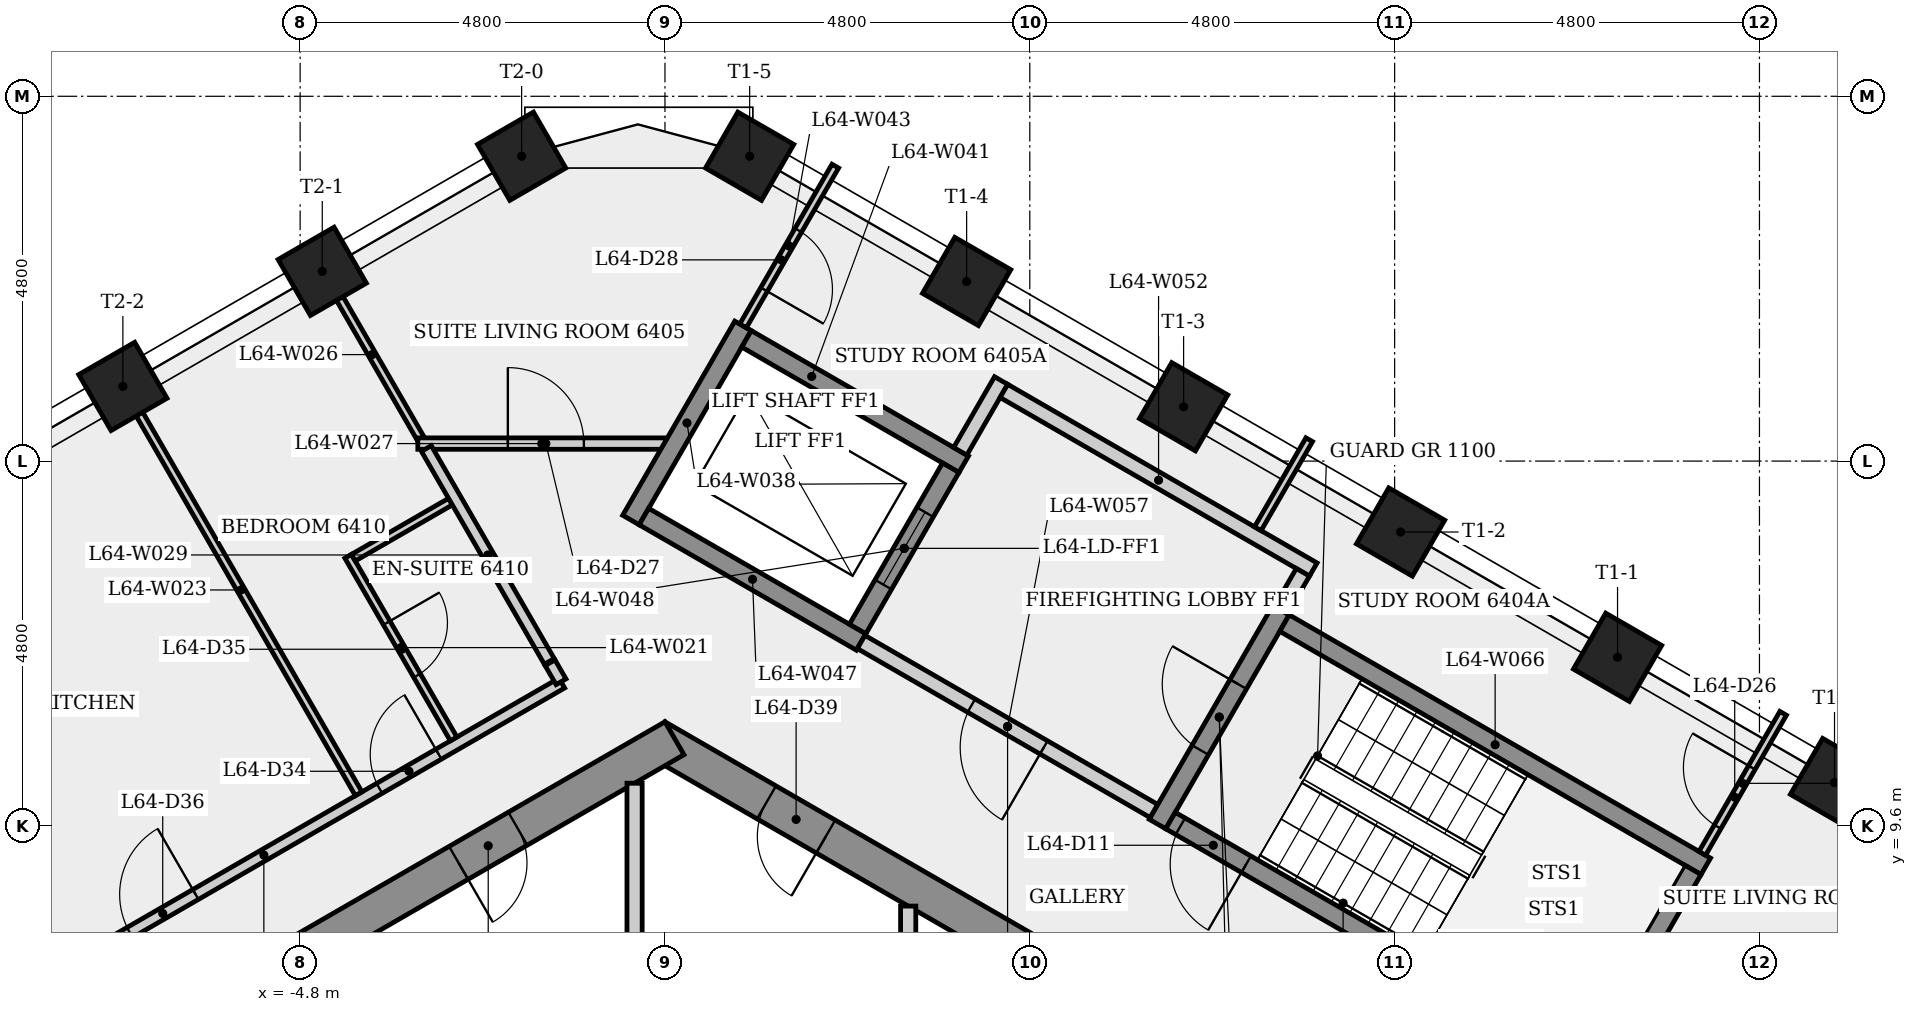
"""IFC4 building model, lengths in metres.
Left out: names, types, materials, properties, quantities, classifications, styles, units other than length and angle.
Written with IfcOpenShell. Run it as: python <this file> out.ifc"""

import sys

from ifc_helpers import new_model, si_unit, direction, frame, frame_2d, origin, origin_2d, place, context, subcontext, project, spatial, rectangle, extrude, element, fill, save


model = new_model("IFC4")
c1 = context("Model", 3, precision=1e-05, world=origin(), true_north=direction((0.0, 1.0)))
c2 = subcontext(c1, "Body", "Model", "MODEL_VIEW")
j1 = project(units=[si_unit("LENGTHUNIT", "METRE"), si_unit("PLANEANGLEUNIT", "RADIAN")], contexts=[c1])
p1 = place(None, origin())
s1 = spatial("IfcSite", under=j1, at=p1, CompositionType="ELEMENT")
p2 = place(p1, origin())
s2 = spatial("IfcBuilding", under=s1, at=p2, CompositionType="ELEMENT")
p3 = place(p2, frame((0.0, 0.0, 239.3)))
s3 = spatial("IfcBuildingStorey", under=s2, at=p3, CompositionType="ELEMENT", Elevation=239.3)
p4 = place(p3, frame((9.375, 5.268, 0.0), z_axis=(0.0, 0.0, 1.0), x_axis=(-0.866023993627, 0.500002442456, 0.0)))
e1 = element("IfcWall", 1, at=p4, inside=s3, PredefinedType="SHEAR", context=c2, shape_type="SweptSolid", body=[
    extrude(rectangle(XDim=10.97, YDim=0.5, at=frame_2d((5.485, 0.0))), origin(), (0.0, 0.0, 1.0), 3.4),
])
p5 = place(p4, frame((8.383, 0.0, 0.0)))
e2 = element("IfcOpeningElement", 2, at=p5, cuts=e1, PredefinedType="OPENING", context=c2, shape_type="SweptSolid", body=[
    extrude(rectangle(XDim=0.9, YDim=2.1, at=frame_2d((0.45, 1.05))), frame((0.0, 0.26, 0.0), z_axis=(0.0, -1.0, 0.0), x_axis=(1.0, 0.0, 0.0)), (0.0, 0.0, 1.0), 0.52),
])
p6 = place(p4, frame((3.165, 0.0, 0.0)))
e3 = element("IfcOpeningElement", 3, at=p6, cuts=e1, PredefinedType="OPENING", context=c2, shape_type="SweptSolid", body=[
    extrude(rectangle(XDim=0.9, YDim=2.1, at=frame_2d((0.45, 1.05))), frame((0.0, 0.26, 0.0), z_axis=(0.0, -1.0, 0.0), x_axis=(1.0, 0.0, 0.0)), (0.0, 0.0, 1.0), 0.52),
])
p7 = place(p3, frame((0.125, 10.753, 0.0), z_axis=(0.0, 0.0, 1.0), x_axis=(-0.866023993627, -0.500002442456, 0.0)))
e4 = element("IfcWall", 4, at=p7, inside=s3, PredefinedType="SHEAR", context=c2, shape_type="SweptSolid", body=[
    extrude(rectangle(XDim=10.97, YDim=0.5, at=frame_2d((5.485, 0.0))), origin(), (0.0, 0.0, 1.0), 3.4),
])
p8 = place(p7, frame((9.043, 0.0, 0.0)))
e5 = element("IfcOpeningElement", 5, at=p8, cuts=e4, PredefinedType="OPENING", context=c2, shape_type="SweptSolid", body=[
    extrude(rectangle(XDim=0.9, YDim=2.1, at=frame_2d((0.45, 1.05))), frame((0.0, 0.26, 0.0), z_axis=(0.0, -1.0, 0.0), x_axis=(1.0, 0.0, 0.0)), (0.0, 0.0, 1.0), 0.52),
])
p9 = place(p7, frame((2.38, 0.0, 0.0)))
e6 = element("IfcOpeningElement", 6, at=p9, cuts=e4, PredefinedType="OPENING", context=c2, shape_type="SweptSolid", body=[
    extrude(rectangle(XDim=0.9, YDim=2.1, at=frame_2d((0.45, 1.05))), frame((0.0, 0.26, 0.0), z_axis=(0.0, -1.0, 0.0), x_axis=(1.0, 0.0, 0.0)), (0.0, 0.0, 1.0), 0.52),
])
for number, where, z_axis, x_axis in (
    (7, (15.387, 10.171, 0.0), (0.0, 0.0, 1.0), (0.5, 0.866, 0.0)),
    (8, (12.533, 11.819, 0.0), (0.0, 0.0, 1.0), (0.5, 0.866, 0.0)),
    (9, (9.678, 13.467, 0.0), (0.0, 0.0, 1.0), (0.5, 0.866, 0.0)),
    (10, (6.823, 15.115, 0.0), (0.0, 0.0, 1.0), (0.5, 0.866, 0.0)),
    (11, (3.969, 16.763, 0.0), (0.0, 0.0, 1.0), (0.5, 0.866, 0.0)),
    (12, (1.114, 18.411, 0.0), (0.0, 0.0, 1.0), (0.5, 0.866, 0.0)),
    (13, (-1.886, 18.411, 0.0), (0.0, 0.0, 1.0), (-0.5, 0.866, 0.0)),
    (14, (-4.509, 16.897, 0.0), (0.0, 0.0, 1.0), (-0.5, 0.866, 0.0)),
    (15, (-7.132, 15.382, 0.0), (0.0, 0.0, 1.0), (-0.5, 0.866, 0.0)),
):
    element("IfcColumn", number, at=place(p3, frame(where, z_axis=z_axis, x_axis=x_axis)), inside=s3, PredefinedType="COLUMN", context=c2, shape_type="SweptSolid", body=[
        extrude(rectangle(XDim=0.85, YDim=0.85, at=origin_2d()), origin(), (0.0, 0.0, 1.0), 3.4),
    ])
p10 = place(p3, frame((-9.198, 6.953, 0.0), z_axis=(0.0, 0.0, 1.0), x_axis=(0.866018971722, 0.500011140494, 0.0)))
e16 = element("IfcWall", 16, at=p10, inside=s3, PredefinedType="PARTITIONING", context=c2, shape_type="SweptSolid", body=[
    extrude(rectangle(XDim=9.053, YDim=0.15, at=frame_2d((4.526, 0.0))), origin(), (0.0, 0.0, 1.0), 3.05),
])
p11 = place(p10, frame((6.282, 0.0, 0.0)))
e17 = element("IfcOpeningElement", 17, at=p11, cuts=e16, PredefinedType="OPENING", context=c2, shape_type="SweptSolid", body=[
    extrude(rectangle(XDim=0.9, YDim=2.1, at=frame_2d((0.45, 1.05))), frame((0.0, 0.085, 0.0), z_axis=(0.0, -1.0, 0.0), x_axis=(1.0, 0.0, 0.0)), (0.0, 0.0, 1.0), 0.17),
])
p12 = place(p10, frame((2.49, 0.0, 0.0)))
e18 = element("IfcOpeningElement", 18, at=p12, cuts=e16, PredefinedType="OPENING", context=c2, shape_type="SweptSolid", body=[
    extrude(rectangle(XDim=1.0, YDim=2.1, at=frame_2d((0.5, 1.05))), frame((0.0, 0.085, 0.0), z_axis=(0.0, -1.0, 0.0), x_axis=(1.0, 0.0, 0.0)), (0.0, 0.0, 1.0), 0.17),
])
p13 = place(p3, frame((-4.168, 13.147, 0.0), z_axis=(0.0, 0.0, 1.0), x_axis=(0.499971228071, -0.866042014628, 0.0)))
e19 = element("IfcWall", 19, at=p13, inside=s3, PredefinedType="PARTITIONING", context=c2, shape_type="SweptSolid", body=[
    extrude(rectangle(XDim=2.775, YDim=0.1, at=frame_2d((1.388, 0.0))), origin(), (0.0, 0.0, 1.0), 3.05),
])
p14 = place(p13, frame((1.012, 0.0, 0.0)))
e20 = element("IfcOpeningElement", 20, at=p14, cuts=e19, PredefinedType="OPENING", context=c2, shape_type="SweptSolid", body=[
    extrude(rectangle(XDim=0.8, YDim=2.1, at=frame_2d((0.4, 1.05))), frame((0.0, 0.06, 0.0), z_axis=(0.0, -1.0, 0.0), x_axis=(1.0, 0.0, 0.0)), (0.0, 0.0, 1.0), 0.12),
])
p15 = place(p3, frame((-4.03, 10.023, 0.0), z_axis=(0.0, 0.0, 1.0), x_axis=(-0.499980681017, 0.866036557317, 0.0)))
e21 = element("IfcWall", 21, at=p15, inside=s3, PredefinedType="PARTITIONING", context=c2, shape_type="SweptSolid", body=[
    extrude(rectangle(XDim=6.193, YDim=0.1, at=frame_2d((3.096, 0.0))), origin(), (0.0, 0.0, 1.0), 3.05),
])
p16 = place(p3, frame((-3.214, 14.695, 0.0), z_axis=(0.0, 0.0, 1.0), x_axis=(-0.500056202316, 0.865992952931, 0.0)))
e22 = element("IfcWall", 22, at=p16, inside=s3, PredefinedType="PARTITIONING", context=c2, shape_type="SweptSolid", body=[
    extrude(rectangle(XDim=2.554, YDim=0.1, at=frame_2d((1.277, 0.0))), origin(), (0.0, 0.0, 1.0), 3.05),
])
p17 = place(p3, frame((-3.252, 14.63, 0.0), z_axis=(0.0, 0.0, 1.0), x_axis=(1.0, 0.0, 0.0)))
e23 = element("IfcWall", 23, at=p17, inside=s3, PredefinedType="PARTITIONING", context=c2, shape_type="SweptSolid", body=[
    extrude(rectangle(XDim=3.26, YDim=0.15, at=frame_2d((1.63, 0.0))), origin(), (0.0, 0.0, 1.0), 3.05),
])
p18 = place(p17, frame((1.185, 0.0, 0.0)))
e24 = element("IfcOpeningElement", 24, at=p18, cuts=e23, PredefinedType="OPENING", context=c2, shape_type="SweptSolid", body=[
    extrude(rectangle(XDim=1.0, YDim=2.1, at=frame_2d((0.5, 1.05))), frame((0.0, 0.085, 0.0), z_axis=(0.0, -1.0, 0.0), x_axis=(1.0, 0.0, 0.0)), (0.0, 0.0, 1.0), 0.17),
])
p19 = place(p3, frame((-2.823, 13.867, 0.0), z_axis=(0.0, 0.0, 1.0), x_axis=(-0.865962262849, -0.500109347365, 0.0)))
e25 = element("IfcWall", 25, at=p19, inside=s3, PredefinedType="PARTITIONING", context=c2, shape_type="SweptSolid", body=[
    extrude(rectangle(XDim=1.475, YDim=0.1, at=frame_2d((0.737, 0.0))), origin(), (0.0, 0.0, 1.0), 3.05),
])
p20 = place(p3, frame((-3.139, 14.565, 0.0), z_axis=(0.0, 0.0, 1.0), x_axis=(0.4999707335, -0.866042300147, 0.0)))
e26 = element("IfcWall", 26, at=p20, inside=s3, PredefinedType="PARTITIONING", context=c2, shape_type="SweptSolid", body=[
    extrude(rectangle(XDim=3.235, YDim=0.15, at=frame_2d((1.617, 0.0))), origin(), (0.0, 0.0, 1.0), 3.05),
])
p21 = place(p3, frame((-1.512, 11.747, 0.0), z_axis=(0.0, 0.0, 1.0), x_axis=(0.500502949238, -0.865734831114, 0.0)))
e27 = element("IfcWall", 27, at=p21, inside=s3, PredefinedType="PARTITIONING", context=c2, shape_type="SweptSolid", body=[
    extrude(rectangle(XDim=0.289, YDim=0.15, at=frame_2d((0.145, 0.0))), origin(), (0.0, 0.0, 1.0), 3.05),
])
p22 = place(p3, frame((-0.4, 10.161, 0.0), z_axis=(0.0, 0.0, 1.0), x_axis=(0.0, -1.0, 0.0)))
e28 = element("IfcWall", 28, at=p22, inside=s3, PredefinedType="PARTITIONING", context=c2, shape_type="SweptSolid", body=[
    extrude(rectangle(XDim=4.886, YDim=0.2, at=frame_2d((2.443, 0.0))), origin(), (0.0, 0.0, 1.0), 3.05),
])
p23 = place(p3, frame((-0.448, 13.624, 0.0), z_axis=(0.0, 0.0, 1.0), x_axis=(0.500037662692, 0.866003658127, 0.0)))
e29 = element("IfcWall", 29, at=p23, inside=s3, PredefinedType="SHEAR", context=c2, shape_type="SweptSolid", body=[
    extrude(rectangle(XDim=2.95, YDim=0.25, at=frame_2d((1.475, 0.0))), origin(), (0.0, 0.0, 1.0), 3.05),
])
p24 = place(p3, frame((1.073, 16.008, 0.0), z_axis=(0.0, 0.0, 1.0), x_axis=(0.866040211805, -0.499974350878, 0.0)))
e30 = element("IfcWall", 30, at=p24, inside=s3, PredefinedType="SHEAR", context=c2, shape_type="SweptSolid", body=[
    extrude(rectangle(XDim=3.3, YDim=0.25, at=frame_2d((1.65, 0.0))), origin(), (0.0, 0.0, 1.0), 3.05),
])
p25 = place(p3, frame((2.241, 18.281, 0.0), z_axis=(0.0, 0.0, 1.0), x_axis=(-0.499957519001, -0.866049928811, 0.0)))
e31 = element("IfcWall", 31, at=p25, inside=s3, PredefinedType="PARTITIONING", context=c2, shape_type="SweptSolid", body=[
    extrude(rectangle(XDim=2.427, YDim=0.1, at=frame_2d((1.214, 0.0))), origin(), (0.0, 0.0, 1.0), 3.05),
])
p26 = place(p25, frame((0.974, 0.0, 0.0)))
e32 = element("IfcOpeningElement", 32, at=p26, cuts=e31, PredefinedType="OPENING", context=c2, shape_type="SweptSolid", body=[
    extrude(rectangle(XDim=0.9, YDim=2.1, at=frame_2d((0.45, 1.05))), frame((0.0, 0.06, 0.0), z_axis=(0.0, -1.0, 0.0), x_axis=(1.0, 0.0, 0.0)), (0.0, 0.0, 1.0), 0.12),
])
p27 = place(p3, frame((2.581, 12.02, 0.0), z_axis=(0.0, 0.0, 1.0), x_axis=(-0.866040211805, 0.499974350878, 0.0)))
e33 = element("IfcWall", 33, at=p27, inside=s3, PredefinedType="SHEAR", context=c2, shape_type="SweptSolid", body=[
    extrude(rectangle(XDim=3.3, YDim=0.25, at=frame_2d((1.65, 0.0))), origin(), (0.0, 0.0, 1.0), 3.05),
])
p28 = place(p3, frame((2.535, 12.191, 0.0), z_axis=(0.0, 0.0, 1.0), x_axis=(0.500061746146, 0.865989751695, 0.0)))
e34 = element("IfcWall", 34, at=p28, inside=s3, PredefinedType="SHEAR", context=c2, shape_type="SweptSolid", body=[
    extrude(rectangle(XDim=2.45, YDim=0.25, at=frame_2d((1.225, 0.0))), origin(), (0.0, 0.0, 1.0), 3.4),
])
p29 = place(p28, frame((0.675, 0.0, 0.0)))
e35 = element("IfcOpeningElement", 35, at=p29, cuts=e34, PredefinedType="OPENING", context=c2, shape_type="SweptSolid", body=[
    extrude(rectangle(XDim=1.1, YDim=2.1, at=frame_2d((0.55, 1.05))), frame((0.0, 0.135, 0.0), z_axis=(0.0, -1.0, 0.0), x_axis=(1.0, 0.0, 0.0)), (0.0, 0.0, 1.0), 0.27),
])
p30 = place(p3, frame((3.2, 8.545, 0.0), z_axis=(0.0, 0.0, 1.0), x_axis=(0.0, -1.0, 0.0)))
e36 = element("IfcWall", 36, at=p30, inside=s3, PredefinedType="PARTITIONING", context=c2, shape_type="SweptSolid", body=[
    extrude(rectangle(XDim=3.27, YDim=0.2, at=frame_2d((1.635, 0.0))), origin(), (0.0, 0.0, 1.0), 3.05),
])
p31 = place(p3, frame((3.885, 14.529, 0.0), z_axis=(0.0, 0.0, 1.0), x_axis=(0.499997628298, 0.866026773083, 0.0)))
e37 = element("IfcWall", 37, at=p31, inside=s3, PredefinedType="PARTITIONING", context=c2, shape_type="SweptSolid", body=[
    extrude(rectangle(XDim=1.075, YDim=0.2, at=frame_2d((0.538, 0.0))), origin(), (0.0, 0.0, 1.0), 3.05),
])
p32 = place(p3, frame((4.459, 15.323, 0.0), z_axis=(0.0, 0.0, 1.0), x_axis=(0.866016039709, -0.500016218704, 0.0)))
e38 = element("IfcWall", 38, at=p32, inside=s3, PredefinedType="PARTITIONING", context=c2, shape_type="SweptSolid", body=[
    extrude(rectangle(XDim=4.7, YDim=0.2, at=frame_2d((2.35, 0.0))), origin(), (0.0, 0.0, 1.0), 3.05),
])
p33 = place(p3, frame((6.435, 9.795, 0.0), z_axis=(0.0, 0.0, 1.0), x_axis=(-0.866012907634, 0.500021643343, 0.0)))
e39 = element("IfcWall", 39, at=p33, inside=s3, PredefinedType="PARTITIONING", context=c2, shape_type="SweptSolid", body=[
    extrude(rectangle(XDim=4.45, YDim=0.2, at=frame_2d((2.225, 0.0))), origin(), (0.0, 0.0, 1.0), 3.05),
])
p34 = place(p33, frame((1.675, 0.0, 0.0)))
e40 = element("IfcOpeningElement", 40, at=p34, cuts=e39, PredefinedType="OPENING", context=c2, shape_type="SweptSolid", body=[
    extrude(rectangle(XDim=1.1, YDim=2.1, at=frame_2d((0.55, 1.05))), frame((0.0, 0.11, 0.0), z_axis=(0.0, -1.0, 0.0), x_axis=(1.0, 0.0, 0.0)), (0.0, 0.0, 1.0), 0.22),
])
p35 = place(p3, frame((6.48, 9.624, 0.0), z_axis=(0.0, 0.0, 1.0), x_axis=(0.500017246033, 0.866015446554, 0.0)))
e41 = element("IfcWall", 41, at=p35, inside=s3, PredefinedType="SHEAR", context=c2, shape_type="SweptSolid", body=[
    extrude(rectangle(XDim=3.25, YDim=0.25, at=frame_2d((1.625, 0.0))), origin(), (0.0, 0.0, 1.0), 3.05),
])
p36 = place(p35, frame((1.125, 0.0, 0.0)))
e42 = element("IfcOpeningElement", 42, at=p36, cuts=e41, PredefinedType="OPENING", context=c2, shape_type="SweptSolid", body=[
    extrude(rectangle(XDim=1.0, YDim=2.1, at=frame_2d((0.5, 1.05))), frame((0.0, 0.135, 0.0), z_axis=(0.0, -1.0, 0.0), x_axis=(1.0, 0.0, 0.0)), (0.0, 0.0, 1.0), 0.27),
])
p37 = place(p3, frame((7.8, 13.51, 0.0), z_axis=(0.0, 0.0, 1.0), x_axis=(0.500061029496, 0.865990165521, 0.0)))
e43 = element("IfcWall", 43, at=p37, inside=s3, PredefinedType="PARTITIONING", context=c2, shape_type="SweptSolid", body=[
    extrude(rectangle(XDim=1.352, YDim=0.1, at=frame_2d((0.676, 0.0))), origin(), (0.0, 0.0, 1.0), 3.05),
])
p38 = place(p3, frame((8.151, 12.268, 0.0), z_axis=(0.0, 0.0, 1.0), x_axis=(0.866025499775, -0.499999833739, 0.0)))
e44 = element("IfcWall", 44, at=p38, inside=s3, PredefinedType="SHEAR", context=c2, shape_type="SweptSolid", body=[
    extrude(rectangle(XDim=6.4, YDim=0.25, at=frame_2d((3.2, 0.0))), origin(), (0.0, 0.0, 1.0), 3.05),
])
p39 = place(p3, frame((8.393, 12.937, 0.0), z_axis=(0.0, 0.0, 1.0), x_axis=(-0.500065409566, -0.86598763626, 0.0)))
e45 = element("IfcWall", 45, at=p39, inside=s3, PredefinedType="PARTITIONING", context=c2, shape_type="SweptSolid", body=[
    extrude(rectangle(XDim=0.575, YDim=0.2, at=frame_2d((0.288, 0.0))), origin(), (0.0, 0.0, 1.0), 3.05),
])
p40 = place(p3, frame((12.194, 6.47, 0.0), z_axis=(0.0, 0.0, 1.0), x_axis=(-0.866025499775, 0.499999833739, 0.0)))
e46 = element("IfcWall", 46, at=p40, inside=s3, PredefinedType="SHEAR", context=c2, shape_type="SweptSolid", body=[
    extrude(rectangle(XDim=6.4, YDim=0.25, at=frame_2d((3.2, 0.0))), origin(), (0.0, 0.0, 1.0), 3.05),
])
p41 = place(p40, frame((5.25, 0.0, 0.0)))
e47 = element("IfcOpeningElement", 47, at=p41, cuts=e46, PredefinedType="OPENING", context=c2, shape_type="SweptSolid", body=[
    extrude(rectangle(XDim=1.0, YDim=2.1, at=frame_2d((0.5, 1.05))), frame((0.0, 0.135, 0.0), z_axis=(0.0, -1.0, 0.0), x_axis=(1.0, 0.0, 0.0)), (0.0, 0.0, 1.0), 0.27),
])
p42 = place(p3, frame((12.148, 6.641, 0.0), z_axis=(0.0, 0.0, 1.0), x_axis=(0.500034990121, 0.866005201286, 0.0)))
e48 = element("IfcWall", 48, at=p42, inside=s3, PredefinedType="SHEAR", context=c2, shape_type="SweptSolid", body=[
    extrude(rectangle(XDim=2.75, YDim=0.25, at=frame_2d((1.375, 0.0))), origin(), (0.0, 0.0, 1.0), 3.05),
])
p43 = place(p3, frame((13.648, 9.239, 0.0), z_axis=(0.0, 0.0, 1.0), x_axis=(0.500063469175, 0.865988756738, 0.0)))
e49 = element("IfcWall", 49, at=p43, inside=s3, PredefinedType="PARTITIONING", context=c2, shape_type="SweptSolid", body=[
    extrude(rectangle(XDim=2.128, YDim=0.1, at=frame_2d((1.064, 0.0))), origin(), (0.0, 0.0, 1.0), 3.05),
])
p44 = place(p43, frame((0.403, 0.0, 0.0)))
e50 = element("IfcOpeningElement", 50, at=p44, cuts=e49, PredefinedType="OPENING", context=c2, shape_type="SweptSolid", body=[
    extrude(rectangle(XDim=0.9, YDim=2.1, at=frame_2d((0.45, 1.05))), frame((0.0, 0.06, 0.0), z_axis=(0.0, -1.0, 0.0), x_axis=(1.0, 0.0, 0.0)), (0.0, 0.0, 1.0), 0.12),
])
p45 = place(p41, origin())
e51 = element("IfcDoor", 51, at=p45, inside=s3, OperationType="SINGLE_SWING_LEFT", PredefinedType="DOOR", context=c2, shape_type="SweptSolid", body=[
    extrude(rectangle(XDim=1.0, YDim=2.1, at=frame_2d((0.5, 1.05))), frame((0.0, 0.025, 0.0), z_axis=(0.0, -1.0, 0.0), x_axis=(1.0, 0.0, 0.0)), (0.0, 0.0, 1.0), 0.05),
])
fill(e47, e51)
p46 = place(p36, origin())
e52 = element("IfcDoor", 52, at=p46, inside=s3, OperationType="SINGLE_SWING_RIGHT", PredefinedType="DOOR", context=c2, shape_type="SweptSolid", body=[
    extrude(rectangle(XDim=1.0, YDim=2.1, at=frame_2d((0.5, 1.05))), frame((0.0, 0.025, 0.0), z_axis=(0.0, -1.0, 0.0), x_axis=(1.0, 0.0, 0.0)), (0.0, 0.0, 1.0), 0.05),
])
fill(e42, e52)
p47 = place(p34, origin())
e53 = element("IfcDoor", 53, at=p47, inside=s3, OperationType="SINGLE_SWING_LEFT", PredefinedType="DOOR", context=c2, shape_type="SweptSolid", body=[
    extrude(rectangle(XDim=1.1, YDim=2.1, at=frame_2d((0.55, 1.05))), frame((0.0, 0.025, 0.0), z_axis=(0.0, -1.0, 0.0), x_axis=(1.0, 0.0, 0.0)), (0.0, 0.0, 1.0), 0.05),
])
fill(e40, e53)
p48 = place(p29, origin())
e54 = element("IfcDoor", 54, at=p48, inside=s3, OperationType="SLIDING_TO_LEFT", PredefinedType="DOOR", context=c2, shape_type="SweptSolid", body=[
    extrude(rectangle(XDim=1.1, YDim=2.1, at=frame_2d((0.55, 1.05))), frame((0.0, 0.025, 0.0), z_axis=(0.0, -1.0, 0.0), x_axis=(1.0, 0.0, 0.0)), (0.0, 0.0, 1.0), 0.05),
])
fill(e35, e54)
p49 = place(p44, origin())
e55 = element("IfcDoor", 55, at=p49, inside=s3, OperationType="SINGLE_SWING_RIGHT", PredefinedType="DOOR", context=c2, shape_type="SweptSolid", body=[
    extrude(rectangle(XDim=0.9, YDim=2.1, at=frame_2d((0.45, 1.05))), frame((0.0, 0.025, 0.0), z_axis=(0.0, -1.0, 0.0), x_axis=(1.0, 0.0, 0.0)), (0.0, 0.0, 1.0), 0.05),
])
fill(e50, e55)
p50 = place(p18, origin())
e56 = element("IfcDoor", 56, at=p50, inside=s3, OperationType="SINGLE_SWING_LEFT", PredefinedType="DOOR", context=c2, shape_type="SweptSolid", body=[
    extrude(rectangle(XDim=1.0, YDim=2.1, at=frame_2d((0.5, 1.05))), frame((0.0, 0.025, 0.0), z_axis=(0.0, -1.0, 0.0), x_axis=(1.0, 0.0, 0.0)), (0.0, 0.0, 1.0), 0.05),
])
fill(e24, e56)
p51 = place(p26, origin())
e57 = element("IfcDoor", 57, at=p51, inside=s3, OperationType="SINGLE_SWING_RIGHT", PredefinedType="DOOR", context=c2, shape_type="SweptSolid", body=[
    extrude(rectangle(XDim=0.9, YDim=2.1, at=frame_2d((0.45, 1.05))), frame((0.0, 0.025, 0.0), z_axis=(0.0, -1.0, 0.0), x_axis=(1.0, 0.0, 0.0)), (0.0, 0.0, 1.0), 0.05),
])
fill(e32, e57)
p52 = place(p11, origin())
e58 = element("IfcDoor", 58, at=p52, inside=s3, OperationType="SINGLE_SWING_RIGHT", PredefinedType="DOOR", context=c2, shape_type="SweptSolid", body=[
    extrude(rectangle(XDim=0.9, YDim=2.1, at=frame_2d((0.45, 1.05))), frame((0.0, 0.025, 0.0), z_axis=(0.0, -1.0, 0.0), x_axis=(1.0, 0.0, 0.0)), (0.0, 0.0, 1.0), 0.05),
])
fill(e17, e58)
p53 = place(p14, origin())
e59 = element("IfcDoor", 59, at=p53, inside=s3, OperationType="SINGLE_SWING_LEFT", PredefinedType="DOOR", context=c2, shape_type="SweptSolid", body=[
    extrude(rectangle(XDim=0.8, YDim=2.1, at=frame_2d((0.4, 1.05))), frame((0.0, 0.025, 0.0), z_axis=(0.0, -1.0, 0.0), x_axis=(1.0, 0.0, 0.0)), (0.0, 0.0, 1.0), 0.05),
])
fill(e20, e59)
p54 = place(p12, origin())
e60 = element("IfcDoor", 60, at=p54, inside=s3, OperationType="SINGLE_SWING_RIGHT", PredefinedType="DOOR", context=c2, shape_type="SweptSolid", body=[
    extrude(rectangle(XDim=1.0, YDim=2.1, at=frame_2d((0.5, 1.05))), frame((0.0, 0.025, 0.0), z_axis=(0.0, -1.0, 0.0), x_axis=(1.0, 0.0, 0.0)), (0.0, 0.0, 1.0), 0.05),
])
fill(e18, e60)
p55 = place(p9, origin())
e61 = element("IfcDoor", 61, at=p55, inside=s3, OperationType="SINGLE_SWING_RIGHT", PredefinedType="DOOR", context=c2, shape_type="SweptSolid", body=[
    extrude(rectangle(XDim=0.9, YDim=2.1, at=frame_2d((0.45, 1.05))), frame((0.0, 0.025, 0.0), z_axis=(0.0, -1.0, 0.0), x_axis=(1.0, 0.0, 0.0)), (0.0, 0.0, 1.0), 0.05),
])
fill(e6, e61)
p56 = place(p5, origin())
e62 = element("IfcDoor", 62, at=p56, inside=s3, OperationType="SINGLE_SWING_LEFT", PredefinedType="DOOR", context=c2, shape_type="SweptSolid", body=[
    extrude(rectangle(XDim=0.9, YDim=2.1, at=frame_2d((0.45, 1.05))), frame((0.0, 0.025, 0.0), z_axis=(0.0, -1.0, 0.0), x_axis=(1.0, 0.0, 0.0)), (0.0, 0.0, 1.0), 0.05),
])
fill(e2, e62)
save(model, sys.argv[1])
